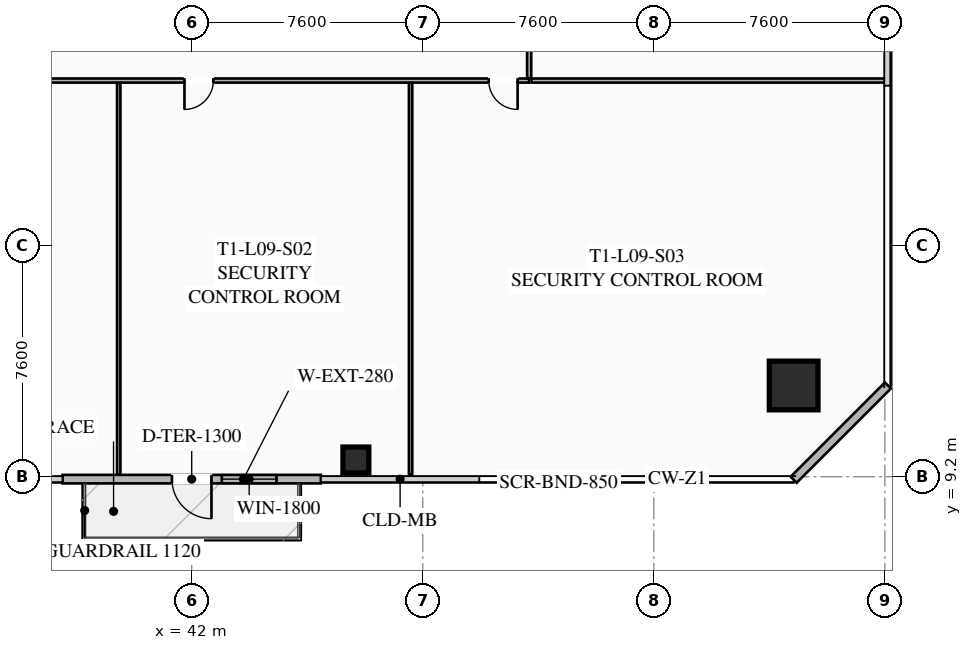
"""IFC4 building model, lengths in metres.
Left out: names, types, materials, properties, quantities, classifications, styles, units other than length and angle.
Written with IfcOpenShell. Run it as: python <this file> out.ifc"""

import sys

from ifc_helpers import new_model, si_unit, direction, frame, frame_2d, origin, origin_2d, place, context, subcontext, project, spatial, rectangle, hollow_rectangle, extrude, element, fill, save


model = new_model("IFC4")
c1 = context("Model", 3, precision=1e-05, world=origin(), true_north=direction((0.0, 1.0)))
c2 = subcontext(c1, "Body", "Model", "MODEL_VIEW")
j1 = project(units=[si_unit("LENGTHUNIT", "METRE"), si_unit("PLANEANGLEUNIT", "RADIAN")], contexts=[c1])
p1 = place(None, origin())
s1 = spatial("IfcSite", under=j1, at=p1, CompositionType="ELEMENT")
p2 = place(p1, origin())
s2 = spatial("IfcBuilding", under=s1, at=p2, CompositionType="ELEMENT")
p3 = place(p2, frame((0.0, 0.0, 38.8)))
s3 = spatial("IfcBuildingStorey", under=s2, at=p3, CompositionType="ELEMENT", Elevation=38.8)
p4 = place(p3, frame((61.8, 12.2, 0.0), z_axis=(0.0, 0.0, 1.0), x_axis=(1.0, 0.0, 0.0)))
e1 = element("IfcColumn", 1, at=p4, inside=s3, PredefinedType="COLUMN", context=c2, shape_type="SweptSolid", body=[
    extrude(hollow_rectangle(XDim=1.6, YDim=1.6, WallThickness=0.06, at=origin_2d()), origin(), (0.0, 0.0, 1.0), 3.35),
])
p5 = place(p3, frame((47.4, 9.75, 0.0), z_axis=(0.0, 0.0, 1.0), x_axis=(1.0, 0.0, 0.0)))
e2 = element("IfcColumn", 2, at=p5, inside=s3, PredefinedType="COLUMN", context=c2, shape_type="SweptSolid", body=[
    extrude(hollow_rectangle(XDim=0.85, YDim=0.85, WallThickness=0.035, at=origin_2d()), origin(), (0.0, 0.0, 1.0), 3.35),
])
p6 = place(p3, frame((46.25, 9.12, 0.0), z_axis=(0.0, 0.0, 1.0), x_axis=(-1.0, 0.0, 0.0)))
e3 = element("IfcWall", 3, at=p6, inside=s3, PredefinedType="SOLIDWALL", context=c2, shape_type="SweptSolid", body=[
    extrude(rectangle(XDim=8.5, YDim=0.28, at=frame_2d((4.25, 0.0))), origin(), (0.0, 0.0, 1.0), 3.35),
])
p7 = place(p6, frame((3.6, 0.0, 0.0)))
e4 = element("IfcOpeningElement", 4, at=p7, cuts=e3, PredefinedType="OPENING", context=c2, shape_type="SweptSolid", body=[
    extrude(rectangle(XDim=1.3, YDim=2.15, at=frame_2d((0.65, 1.075))), frame((0.0, 0.15, 0.0), z_axis=(0.0, -1.0, 0.0), x_axis=(1.0, 0.0, 0.0)), (0.0, 0.0, 1.0), 0.3),
])
p8 = place(p6, frame((1.46, 0.0, 0.85)))
e5 = element("IfcOpeningElement", 5, at=p8, cuts=e3, PredefinedType="OPENING", context=c2, shape_type="SweptSolid", body=[
    extrude(rectangle(XDim=1.8, YDim=1.92, at=frame_2d((0.9, 0.96))), frame((0.0, 0.15, 0.0), z_axis=(0.0, -1.0, 0.0), x_axis=(1.0, 0.0, 0.0)), (0.0, 0.0, 1.0), 0.3),
])
p9 = place(p3, frame((64.9, 12.2, 0.0), z_axis=(0.0, 0.0, 1.0), x_axis=(-0.707106781187, -0.707106781187, 0.0)))
e6 = element("IfcWall", 6, at=p9, inside=s3, PredefinedType="SOLIDWALL", context=c2, shape_type="SweptSolid", body=[
    extrude(rectangle(XDim=4.384, YDim=0.28, at=frame_2d((2.192, 0.0))), origin(), (0.0, 0.0, 1.0), 3.35),
])
p10 = place(p3, frame((53.1, 22.23, 0.0), z_axis=(0.0, 0.0, 1.0), x_axis=(-1.0, 0.0, 0.0)))
e7 = element("IfcWall", 7, at=p10, inside=s3, PredefinedType="PARTITIONING", context=c2, shape_type="SweptSolid", body=[
    extrude(rectangle(XDim=30.75, YDim=0.135, at=frame_2d((15.375, 0.0))), origin(), (0.0, 0.0, 1.0), 2.703),
])
p11 = place(p10, frame((29.42, 0.0, 0.0)))
e8 = element("IfcOpeningElement", 8, at=p11, cuts=e7, PredefinedType="OPENING", context=c2, shape_type="SweptSolid", body=[
    extrude(rectangle(XDim=0.95, YDim=2.05, at=frame_2d((0.475, 1.025))), frame((0.0, 0.077, 0.0), z_axis=(0.0, -1.0, 0.0), x_axis=(1.0, 0.0, 0.0)), (0.0, 0.0, 1.0), 0.155),
])
p12 = place(p10, frame((10.388, 0.0, 0.0)))
e9 = element("IfcOpeningElement", 9, at=p12, cuts=e7, PredefinedType="OPENING", context=c2, shape_type="SweptSolid", body=[
    extrude(rectangle(XDim=0.95, YDim=2.05, at=frame_2d((0.475, 1.025))), frame((0.0, 0.077, 0.0), z_axis=(0.0, -1.0, 0.0), x_axis=(1.0, 0.0, 0.0)), (0.0, 0.0, 1.0), 0.155),
])
p13 = place(p10, frame((0.38, 0.0, 0.0)))
e10 = element("IfcOpeningElement", 10, at=p13, cuts=e7, PredefinedType="OPENING", context=c2, shape_type="SweptSolid", body=[
    extrude(rectangle(XDim=0.95, YDim=2.05, at=frame_2d((0.475, 1.025))), frame((0.0, 0.077, 0.0), z_axis=(0.0, -1.0, 0.0), x_axis=(1.0, 0.0, 0.0)), (0.0, 0.0, 1.0), 0.155),
])
for number, where, z_axis, x_axis in (
    (11, (39.6, 9.27, 0.0), (0.0, 0.0, 1.0), (0.0, 1.0, 0.0)),
    (12, (49.2, 9.27, 0.0), (0.0, 0.0, 1.0), (0.0, 1.0, 0.0)),
):
    element("IfcWall", number, at=place(p3, frame(where, z_axis=z_axis, x_axis=x_axis)), inside=s3, PredefinedType="PARTITIONING", context=c2, shape_type="SweptSolid", body=[
        extrude(rectangle(XDim=12.88, YDim=0.11, at=frame_2d((6.44, 0.0))), origin(), (0.0, 0.0, 1.0), 2.703),
    ])
p14 = place(p3, frame((53.1, 43.22, 0.0), z_axis=(0.0, 0.0, 1.0), x_axis=(0.0, -1.0, 0.0)))
e13 = element("IfcWall", 13, at=p14, inside=s3, PredefinedType="PARTITIONING", context=c2, shape_type="SweptSolid", body=[
    extrude(rectangle(XDim=20.91, YDim=0.135, at=frame_2d((10.455, 0.0))), origin(), (0.0, 0.0, 1.0), 2.703),
])
p15 = place(p14, frame((10.653, 0.0, 0.0)))
e14 = element("IfcOpeningElement", 14, at=p15, cuts=e13, PredefinedType="OPENING", context=c2, shape_type="SweptSolid", body=[
    extrude(rectangle(XDim=0.95, YDim=2.05, at=frame_2d((0.475, 1.025))), frame((0.0, 0.077, 0.0), z_axis=(0.0, -1.0, 0.0), x_axis=(1.0, 0.0, 0.0)), (0.0, 0.0, 1.0), 0.155),
])
p16 = place(p14, frame((0.3, 0.0, 0.0)))
e15 = element("IfcOpeningElement", 15, at=p16, cuts=e13, PredefinedType="OPENING", context=c2, shape_type="SweptSolid", body=[
    extrude(rectangle(XDim=0.95, YDim=2.05, at=frame_2d((0.475, 1.025))), frame((0.0, 0.077, 0.0), z_axis=(0.0, -1.0, 0.0), x_axis=(1.0, 0.0, 0.0)), (0.0, 0.0, 1.0), 0.155),
])
p17 = place(p3, frame((53.18, 22.23, 0.0), z_axis=(0.0, 0.0, 1.0), x_axis=(1.0, 0.0, 0.0)))
e16 = element("IfcWall", 16, at=p17, inside=s3, PredefinedType="PARTITIONING", context=c2, shape_type="SweptSolid", body=[
    extrude(rectangle(XDim=11.7, YDim=0.135, at=frame_2d((5.85, 0.0))), origin(), (0.0, 0.0, 1.0), 2.703),
])
p18 = place(p7, origin())
e17 = element("IfcDoor", 17, at=p18, inside=s3, OperationType="SINGLE_SWING_LEFT", PredefinedType="DOOR", context=c2, shape_type="SweptSolid", body=[
    extrude(rectangle(XDim=1.3, YDim=2.15, at=frame_2d((0.65, 1.075))), frame((0.0, 0.025, 0.0), z_axis=(0.0, -1.0, 0.0), x_axis=(1.0, 0.0, 0.0)), (0.0, 0.0, 1.0), 0.05),
])
fill(e4, e17)
p19 = place(p8, origin())
e18 = element("IfcWindow", 18, at=p19, inside=s3, PartitioningType="SINGLE_PANEL", PredefinedType="WINDOW", context=c2, shape_type="SweptSolid", body=[
    extrude(rectangle(XDim=1.8, YDim=1.92, at=frame_2d((0.9, 0.96))), frame((0.0, 0.03, 0.0), z_axis=(0.0, -1.0, 0.0), x_axis=(1.0, 0.0, 0.0)), (0.0, 0.0, 1.0), 0.06),
])
fill(e5, e18)
p20 = place(p12, origin())
e19 = element("IfcDoor", 19, at=p20, inside=s3, OperationType="SINGLE_SWING_RIGHT", PredefinedType="DOOR", context=c2, shape_type="SweptSolid", body=[
    extrude(rectangle(XDim=0.95, YDim=2.05, at=frame_2d((0.475, 1.025))), frame((0.0, 0.025, 0.0), z_axis=(0.0, -1.0, 0.0), x_axis=(1.0, 0.0, 0.0)), (0.0, 0.0, 1.0), 0.05),
])
fill(e9, e19)
p21 = place(p13, origin())
e20 = element("IfcDoor", 20, at=p21, inside=s3, OperationType="SINGLE_SWING_LEFT", PredefinedType="DOOR", context=c2, shape_type="SweptSolid", body=[
    extrude(rectangle(XDim=0.95, YDim=2.05, at=frame_2d((0.475, 1.025))), frame((0.0, 0.025, 0.0), z_axis=(0.0, -1.0, 0.0), x_axis=(1.0, 0.0, 0.0)), (0.0, 0.0, 1.0), 0.05),
])
fill(e10, e20)
save(model, sys.argv[1])
